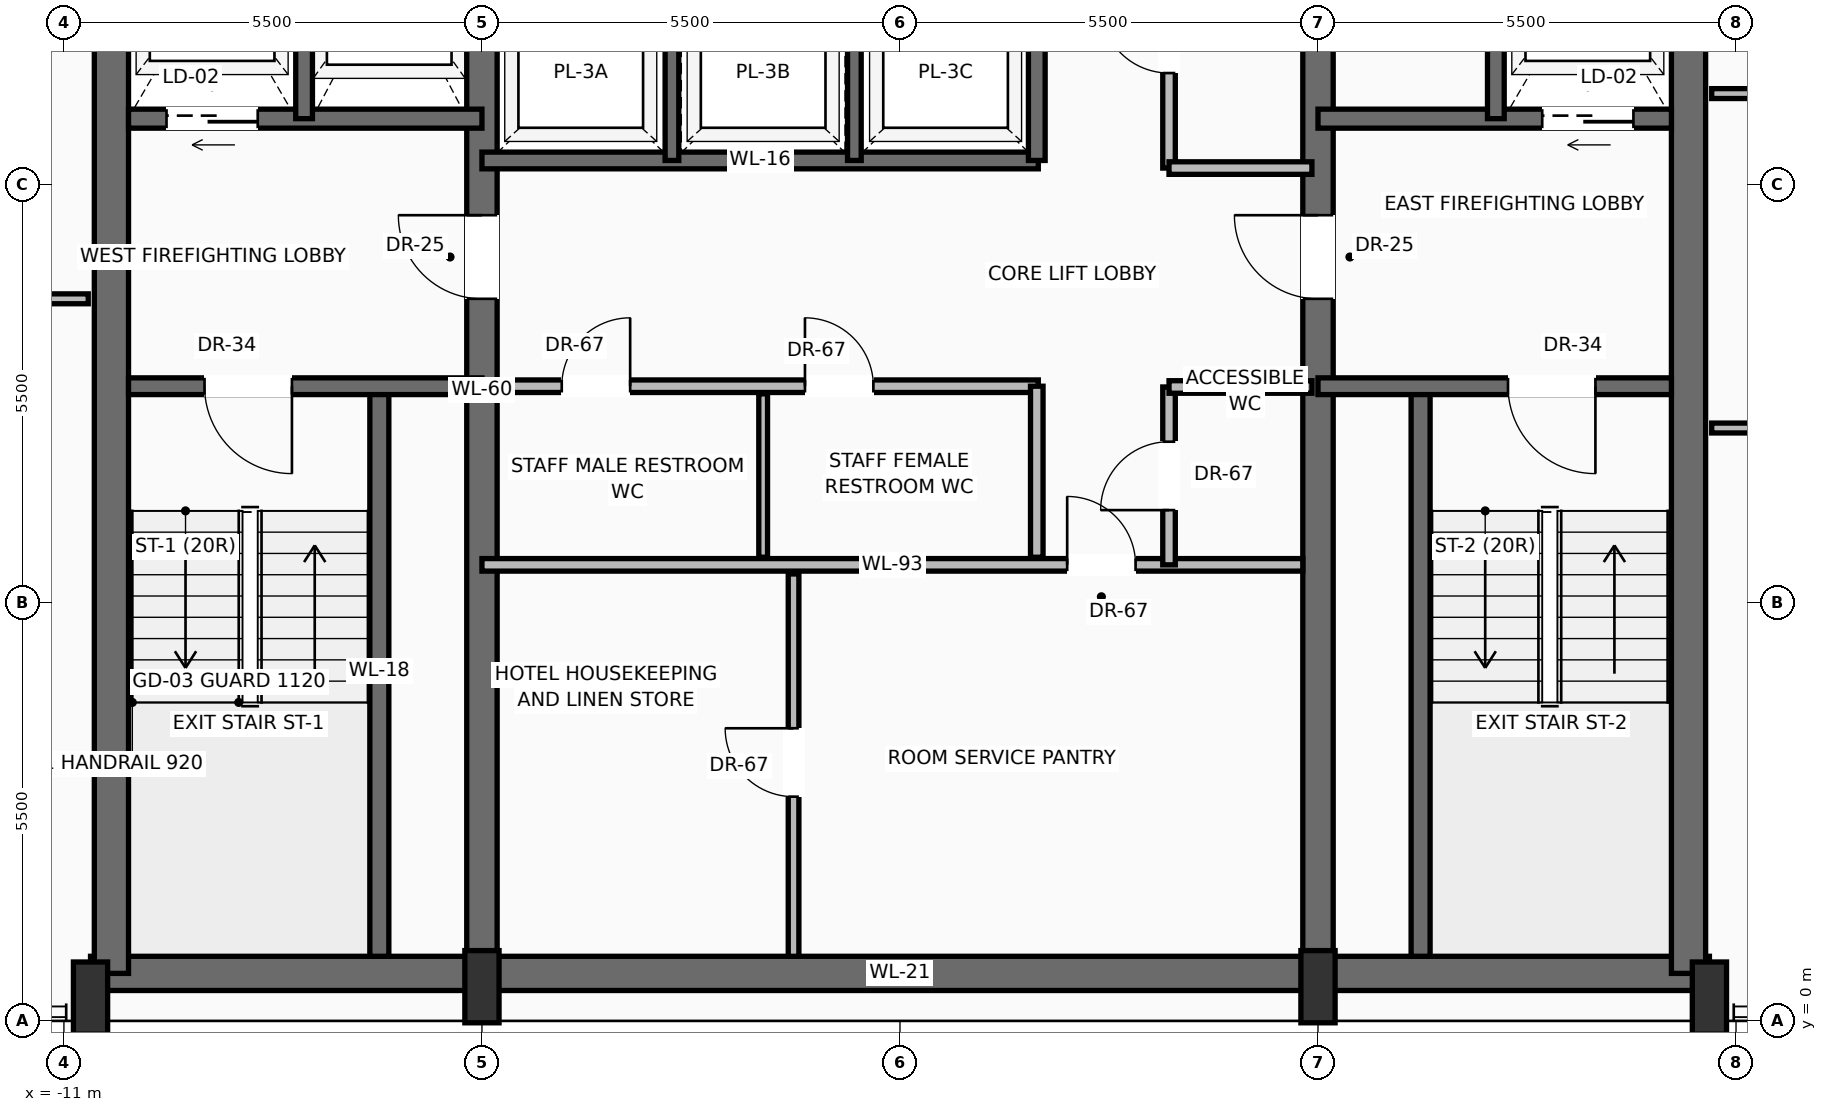
"""IFC4 building model, lengths in metres.
Left out: names, types, materials, properties, quantities, classifications, styles, units other than length and angle.
Written with IfcOpenShell. Run it as: python <this file> out.ifc"""

import sys

from ifc_helpers import new_model, si_unit, direction, frame, frame_2d, origin, origin_2d, place, context, subcontext, project, spatial, rectangle, extrude, source, transform, mapped, element, fill, save


model = new_model("IFC4")
c1 = context("Model", 3, precision=1e-05, world=origin(), true_north=direction((0.0, 1.0)))
c2 = subcontext(c1, "Body", "Model", "MODEL_VIEW")
j1 = project(units=[si_unit("LENGTHUNIT", "METRE"), si_unit("PLANEANGLEUNIT", "RADIAN")], contexts=[c1])
p1 = place(None, origin())
s1 = spatial("IfcSite", under=j1, at=p1, CompositionType="ELEMENT")
p2 = place(p1, origin())
s2 = spatial("IfcBuilding", under=s1, at=p2, CompositionType="ELEMENT")
p3 = place(p2, frame((0.0, 0.0, 297.15)))
s3 = spatial("IfcBuildingStorey", under=s2, at=p3, CompositionType="ELEMENT", Elevation=297.15)
p4 = place(p3, frame((-10.65, 0.625, 0.0), z_axis=(0.0, 0.0, 1.0), x_axis=(1.0, 0.0, 0.0)))
e1 = element("IfcWall", 1, at=p4, inside=s3, PredefinedType="SHEAR", context=c2, shape_type="SweptSolid", body=[
    extrude(rectangle(XDim=21.3, YDim=0.45, at=frame_2d((10.65, 0.0))), origin(), (0.0, 0.0, 1.0), 3.24),
])
for number, where, z_axis, x_axis in (
    (2, (-10.375, 0.625, 0.0), (0.0, 0.0, 1.0), (0.0, 1.0, 0.0)),
    (3, (10.375, 0.625, 0.0), (0.0, 0.0, 1.0), (0.0, 1.0, 0.0)),
):
    element("IfcWall", number, at=place(p3, frame(where, z_axis=z_axis, x_axis=x_axis)), inside=s3, PredefinedType="SHEAR", context=c2, shape_type="SweptSolid", body=[
        extrude(rectangle(XDim=15.35, YDim=0.45, at=frame_2d((7.675, 0.0))), origin(), (0.0, 0.0, 1.0), 3.24),
    ])
p5 = place(p3, frame((-5.5, 0.625, 0.0), z_axis=(0.0, 0.0, 1.0), x_axis=(0.0, 1.0, 0.0)))
e4 = element("IfcWall", 4, at=p5, inside=s3, PredefinedType="SHEAR", context=c2, shape_type="SweptSolid", body=[
    extrude(rectangle(XDim=15.35, YDim=0.4, at=frame_2d((7.675, 0.0))), origin(), (0.0, 0.0, 1.0), 3.24),
])
p6 = place(p5, frame((8.875, 0.0, 0.0)))
e5 = element("IfcOpeningElement", 5, at=p6, cuts=e4, PredefinedType="OPENING", context=c2, shape_type="SweptSolid", body=[
    extrude(rectangle(XDim=1.1, YDim=2.2, at=frame_2d((0.55, 1.1))), frame((0.0, 0.21, 0.0), z_axis=(0.0, -1.0, 0.0), x_axis=(1.0, 0.0, 0.0)), (0.0, 0.0, 1.0), 0.42),
])
p7 = place(p3, frame((5.5, 0.625, 0.0), z_axis=(0.0, 0.0, 1.0), x_axis=(0.0, 1.0, 0.0)))
e6 = element("IfcWall", 6, at=p7, inside=s3, PredefinedType="SHEAR", context=c2, shape_type="SweptSolid", body=[
    extrude(rectangle(XDim=15.35, YDim=0.4, at=frame_2d((7.675, 0.0))), origin(), (0.0, 0.0, 1.0), 3.24),
])
p8 = place(p7, frame((8.875, 0.0, 0.0)))
e7 = element("IfcOpeningElement", 7, at=p8, cuts=e6, PredefinedType="OPENING", context=c2, shape_type="SweptSolid", body=[
    extrude(rectangle(XDim=1.1, YDim=2.2, at=frame_2d((0.55, 1.1))), frame((0.0, 0.21, 0.0), z_axis=(0.0, -1.0, 0.0), x_axis=(1.0, 0.0, 0.0)), (0.0, 0.0, 1.0), 0.42),
])
m1 = source(origin(), c2, "Body", "SweptSolid", [
    extrude(rectangle(XDim=0.45, YDim=0.95, at=origin_2d()), origin(), (0.0, 0.0, 1.0), 3.45),
])
for number, where, z_axis, x_axis in (
    (8, (-10.65, 0.3, 0.0), (0.0, 0.0, 1.0), (1.0, 0.0, 0.0)),
    (9, (-5.5, 0.45, 0.0), (0.0, 0.0, 1.0), (1.0, 0.0, 0.0)),
    (10, (5.5, 0.45, 0.0), (0.0, 0.0, 1.0), (1.0, 0.0, 0.0)),
    (11, (10.65, 0.3, 0.0), (0.0, 0.0, 1.0), (1.0, 0.0, 0.0)),
):
    element("IfcColumn", number, at=place(p3, frame(where, z_axis=z_axis, x_axis=x_axis)), inside=s3, PredefinedType="PILASTER", context=c2, shape_type="MappedRepresentation", body=[
        mapped(m1, transform((0.0, 0.0, 0.0), scale=1.0)),
    ])
p9 = place(p3, frame((-6.85, 0.85, 0.0), z_axis=(0.0, 0.0, 1.0), x_axis=(0.0, 1.0, 0.0)))
e12 = element("IfcWall", 12, at=p9, inside=s3, PredefinedType="SOLIDWALL", context=c2, shape_type="SweptSolid", body=[
    extrude(rectangle(XDim=7.5, YDim=0.25, at=frame_2d((3.75, 0.0))), origin(), (0.0, 0.0, 1.0), 3.24),
])
p10 = place(p3, frame((-5.5, 8.35, 0.0), z_axis=(0.0, 0.0, 1.0), x_axis=(-1.0, 0.0, 0.0)))
e13 = element("IfcWall", 13, at=p10, inside=s3, PredefinedType="SOLIDWALL", context=c2, shape_type="SweptSolid", body=[
    extrude(rectangle(XDim=4.65, YDim=0.22, at=frame_2d((2.325, 0.0))), origin(), (0.0, 0.0, 1.0), 3.24),
])
p11 = place(p10, frame((2.5, 0.0, 0.0)))
e14 = element("IfcOpeningElement", 14, at=p11, cuts=e13, PredefinedType="OPENING", context=c2, shape_type="SweptSolid", body=[
    extrude(rectangle(XDim=1.15, YDim=2.2, at=frame_2d((0.575, 1.1))), frame((0.0, 0.12, 0.0), z_axis=(0.0, -1.0, 0.0), x_axis=(1.0, 0.0, 0.0)), (0.0, 0.0, 1.0), 0.24),
])
p12 = place(p3, frame((-5.5, 11.87, 0.0), z_axis=(0.0, 0.0, 1.0), x_axis=(-1.0, 0.0, 0.0)))
e15 = element("IfcWall", 15, at=p12, inside=s3, PredefinedType="SOLIDWALL", context=c2, shape_type="SweptSolid", body=[
    extrude(rectangle(XDim=4.65, YDim=0.25, at=frame_2d((2.325, 0.0))), origin(), (0.0, 0.0, 1.0), 3.24),
])
p13 = place(p12, frame((2.95, 0.0, 0.0)))
e16 = element("IfcOpeningElement", 16, at=p13, cuts=e15, PredefinedType="OPENING", context=c2, shape_type="SweptSolid", body=[
    extrude(rectangle(XDim=1.2, YDim=2.25, at=frame_2d((0.6, 1.125))), frame((0.0, 0.135, 0.0), z_axis=(0.0, -1.0, 0.0), x_axis=(1.0, 0.0, 0.0)), (0.0, 0.0, 1.0), 0.27),
])
p14 = place(p3, frame((-7.84, 11.87, 0.0), z_axis=(0.0, 0.0, 1.0), x_axis=(0.0, 1.0, 0.0)))
e17 = element("IfcWall", 17, at=p14, inside=s3, PredefinedType="SOLIDWALL", context=c2, shape_type="SweptSolid", body=[
    extrude(rectangle(XDim=3.88, YDim=0.22, at=frame_2d((1.94, 0.0))), origin(), (0.0, 0.0, 1.0), 3.24),
])
p15 = place(p3, frame((6.85, 0.85, 0.0), z_axis=(0.0, 0.0, 1.0), x_axis=(0.0, 1.0, 0.0)))
e18 = element("IfcWall", 18, at=p15, inside=s3, PredefinedType="SOLIDWALL", context=c2, shape_type="SweptSolid", body=[
    extrude(rectangle(XDim=7.5, YDim=0.25, at=frame_2d((3.75, 0.0))), origin(), (0.0, 0.0, 1.0), 3.24),
])
p16 = place(p3, frame((10.15, 8.35, 0.0), z_axis=(0.0, 0.0, 1.0), x_axis=(-1.0, 0.0, 0.0)))
e19 = element("IfcWall", 19, at=p16, inside=s3, PredefinedType="SOLIDWALL", context=c2, shape_type="SweptSolid", body=[
    extrude(rectangle(XDim=4.65, YDim=0.22, at=frame_2d((2.325, 0.0))), origin(), (0.0, 0.0, 1.0), 3.24),
])
p17 = place(p16, frame((1.0, 0.0, 0.0)))
e20 = element("IfcOpeningElement", 20, at=p17, cuts=e19, PredefinedType="OPENING", context=c2, shape_type="SweptSolid", body=[
    extrude(rectangle(XDim=1.15, YDim=2.2, at=frame_2d((0.575, 1.1))), frame((0.0, 0.12, 0.0), z_axis=(0.0, -1.0, 0.0), x_axis=(1.0, 0.0, 0.0)), (0.0, 0.0, 1.0), 0.24),
])
p18 = place(p3, frame((10.15, 11.87, 0.0), z_axis=(0.0, 0.0, 1.0), x_axis=(-1.0, 0.0, 0.0)))
e21 = element("IfcWall", 21, at=p18, inside=s3, PredefinedType="SOLIDWALL", context=c2, shape_type="SweptSolid", body=[
    extrude(rectangle(XDim=4.65, YDim=0.25, at=frame_2d((2.325, 0.0))), origin(), (0.0, 0.0, 1.0), 3.24),
])
p19 = place(p18, frame((0.5, 0.0, 0.0)))
e22 = element("IfcOpeningElement", 22, at=p19, cuts=e21, PredefinedType="OPENING", context=c2, shape_type="SweptSolid", body=[
    extrude(rectangle(XDim=1.2, YDim=2.25, at=frame_2d((0.6, 1.125))), frame((0.0, 0.135, 0.0), z_axis=(0.0, -1.0, 0.0), x_axis=(1.0, 0.0, 0.0)), (0.0, 0.0, 1.0), 0.27),
])
p20 = place(p3, frame((7.84, 11.87, 0.0), z_axis=(0.0, 0.0, 1.0), x_axis=(0.0, 1.0, 0.0)))
e23 = element("IfcWall", 23, at=p20, inside=s3, PredefinedType="SOLIDWALL", context=c2, shape_type="SweptSolid", body=[
    extrude(rectangle(XDim=3.88, YDim=0.22, at=frame_2d((1.94, 0.0))), origin(), (0.0, 0.0, 1.0), 3.24),
])
p21 = place(p3, frame((-5.5, 6.0, 0.0), z_axis=(0.0, 0.0, 1.0), x_axis=(1.0, 0.0, 0.0)))
e24 = element("IfcWall", 24, at=p21, inside=s3, PredefinedType="PARTITIONING", context=c2, shape_type="SweptSolid", body=[
    extrude(rectangle(XDim=10.8, YDim=0.165, at=frame_2d((5.4, 0.0))), origin(), (0.0, 0.0, 1.0), 3.232),
])
p22 = place(p21, frame((7.7, 0.0, 0.0)))
e25 = element("IfcOpeningElement", 25, at=p22, cuts=e24, PredefinedType="OPENING", context=c2, shape_type="SweptSolid", body=[
    extrude(rectangle(XDim=0.9, YDim=2.1, at=frame_2d((0.45, 1.05))), frame((0.0, 0.093, 0.0), z_axis=(0.0, -1.0, 0.0), x_axis=(1.0, 0.0, 0.0)), (0.0, 0.0, 1.0), 0.185),
])
p23 = place(p3, frame((-1.4, 0.85, 0.0), z_axis=(0.0, 0.0, 1.0), x_axis=(0.0, 1.0, 0.0)))
e26 = element("IfcWall", 26, at=p23, inside=s3, PredefinedType="PARTITIONING", context=c2, shape_type="SweptSolid", body=[
    extrude(rectangle(XDim=5.03, YDim=0.14, at=frame_2d((2.515, 0.0))), origin(), (0.0, 0.0, 1.0), 3.232),
])
p24 = place(p23, frame((2.1, 0.0, 0.0)))
e27 = element("IfcOpeningElement", 27, at=p24, cuts=e26, PredefinedType="OPENING", context=c2, shape_type="SweptSolid", body=[
    extrude(rectangle(XDim=0.9, YDim=2.1, at=frame_2d((0.45, 1.05))), frame((0.0, 0.08, 0.0), z_axis=(0.0, -1.0, 0.0), x_axis=(1.0, 0.0, 0.0)), (0.0, 0.0, 1.0), 0.16),
])
p25 = place(p3, frame((3.54, 6.0, 0.0), z_axis=(0.0, 0.0, 1.0), x_axis=(0.0, 1.0, 0.0)))
e28 = element("IfcWall", 28, at=p25, inside=s3, PredefinedType="PARTITIONING", context=c2, shape_type="SweptSolid", body=[
    extrude(rectangle(XDim=2.34, YDim=0.165, at=frame_2d((1.17, 0.0))), origin(), (0.0, 0.0, 1.0), 3.232),
])
p26 = place(p25, frame((0.72, 0.0, 0.0)))
e29 = element("IfcOpeningElement", 29, at=p26, cuts=e28, PredefinedType="OPENING", context=c2, shape_type="SweptSolid", body=[
    extrude(rectangle(XDim=0.9, YDim=2.1, at=frame_2d((0.45, 1.05))), frame((0.0, 0.093, 0.0), z_axis=(0.0, -1.0, 0.0), x_axis=(1.0, 0.0, 0.0)), (0.0, 0.0, 1.0), 0.185),
])
p27 = place(p3, frame((3.54, 8.34, 0.0), z_axis=(0.0, 0.0, 1.0), x_axis=(1.0, 0.0, 0.0)))
e30 = element("IfcWall", 30, at=p27, inside=s3, PredefinedType="PARTITIONING", context=c2, shape_type="SweptSolid", body=[
    extrude(rectangle(XDim=1.88, YDim=0.165, at=frame_2d((0.94, 0.0))), origin(), (0.0, 0.0, 1.0), 3.232),
])
p28 = place(p3, frame((-5.3, 8.35, 0.0), z_axis=(0.0, 0.0, 1.0), x_axis=(1.0, 0.0, 0.0)))
e31 = element("IfcWall", 31, at=p28, inside=s3, PredefinedType="PARTITIONING", context=c2, shape_type="SweptSolid", body=[
    extrude(rectangle(XDim=7.12, YDim=0.165, at=frame_2d((3.56, 0.0))), origin(), (0.0, 0.0, 1.0), 3.232),
])
p29 = place(p28, frame((0.85, 0.0, 0.0)))
e32 = element("IfcOpeningElement", 32, at=p29, cuts=e31, PredefinedType="OPENING", context=c2, shape_type="SweptSolid", body=[
    extrude(rectangle(XDim=0.9, YDim=2.1, at=frame_2d((0.45, 1.05))), frame((0.0, 0.093, 0.0), z_axis=(0.0, -1.0, 0.0), x_axis=(1.0, 0.0, 0.0)), (0.0, 0.0, 1.0), 0.185),
])
p30 = place(p28, frame((4.05, 0.0, 0.0)))
e33 = element("IfcOpeningElement", 33, at=p30, cuts=e31, PredefinedType="OPENING", context=c2, shape_type="SweptSolid", body=[
    extrude(rectangle(XDim=0.9, YDim=2.1, at=frame_2d((0.45, 1.05))), frame((0.0, 0.093, 0.0), z_axis=(0.0, -1.0, 0.0), x_axis=(1.0, 0.0, 0.0)), (0.0, 0.0, 1.0), 0.185),
])
p31 = place(p3, frame((1.8, 6.1, 0.0), z_axis=(0.0, 0.0, 1.0), x_axis=(0.0, 1.0, 0.0)))
e34 = element("IfcWall", 34, at=p31, inside=s3, PredefinedType="PARTITIONING", context=c2, shape_type="SweptSolid", body=[
    extrude(rectangle(XDim=2.25, YDim=0.165, at=frame_2d((1.125, 0.0))), origin(), (0.0, 0.0, 1.0), 3.232),
])
p32 = place(p3, frame((-1.8, 6.1, 0.0), z_axis=(0.0, 0.0, 1.0), x_axis=(0.0, 1.0, 0.0)))
e35 = element("IfcWall", 35, at=p32, inside=s3, PredefinedType="PARTITIONING", context=c2, shape_type="SweptSolid", body=[
    extrude(rectangle(XDim=2.15, YDim=0.115, at=frame_2d((1.075, 0.0))), origin(), (0.0, 0.0, 1.0), 3.232),
])
p33 = place(p3, frame((-5.5, 11.32, 0.0), z_axis=(0.0, 0.0, 1.0), x_axis=(1.0, 0.0, 0.0)))
e36 = element("IfcWall", 36, at=p33, inside=s3, PredefinedType="SOLIDWALL", context=c2, shape_type="SweptSolid", body=[
    extrude(rectangle(XDim=7.32, YDim=0.22, at=frame_2d((3.66, 0.0))), origin(), (0.0, 0.0, 1.0), 3.24),
])
p34 = place(p3, frame((1.8, 11.32, 0.0), z_axis=(0.0, 0.0, 1.0), x_axis=(0.0, 1.0, 0.0)))
e37 = element("IfcWall", 37, at=p34, inside=s3, PredefinedType="SOLIDWALL", context=c2, shape_type="SweptSolid", body=[
    extrude(rectangle(XDim=2.3, YDim=0.22, at=frame_2d((1.15, 0.0))), origin(), (0.0, 0.0, 1.0), 3.24),
])
for number, where, z_axis, x_axis in (
    (38, (-3.0, 11.32, 0.0), (0.0, 0.0, 1.0), (0.0, 1.0, 0.0)),
    (39, (-0.6, 11.32, 0.0), (0.0, 0.0, 1.0), (0.0, 1.0, 0.0)),
):
    element("IfcWall", number, at=place(p3, frame(where, z_axis=z_axis, x_axis=x_axis)), inside=s3, PredefinedType="SOLIDWALL", context=c2, shape_type="SweptSolid", body=[
        extrude(rectangle(XDim=2.3, YDim=0.18, at=frame_2d((1.15, 0.0))), origin(), (0.0, 0.0, 1.0), 3.24),
    ])
p35 = place(p3, frame((3.54, 11.22, 0.0), z_axis=(0.0, 0.0, 1.0), x_axis=(0.0, 1.0, 0.0)))
e40 = element("IfcWall", 40, at=p35, inside=s3, PredefinedType="PARTITIONING", context=c2, shape_type="SweptSolid", body=[
    extrude(rectangle(XDim=4.53, YDim=0.165, at=frame_2d((2.265, 0.0))), origin(), (0.0, 0.0, 1.0), 3.232),
])
p36 = place(p35, frame((1.25, 0.0, 0.0)))
e41 = element("IfcOpeningElement", 41, at=p36, cuts=e40, PredefinedType="OPENING", context=c2, shape_type="SweptSolid", body=[
    extrude(rectangle(XDim=0.9, YDim=2.1, at=frame_2d((0.45, 1.05))), frame((0.0, 0.093, 0.0), z_axis=(0.0, -1.0, 0.0), x_axis=(1.0, 0.0, 0.0)), (0.0, 0.0, 1.0), 0.185),
])
p37 = place(p3, frame((3.54, 11.22, 0.0), z_axis=(0.0, 0.0, 1.0), x_axis=(1.0, 0.0, 0.0)))
e42 = element("IfcWall", 42, at=p37, inside=s3, PredefinedType="PARTITIONING", context=c2, shape_type="SweptSolid", body=[
    extrude(rectangle(XDim=1.88, YDim=0.165, at=frame_2d((0.94, 0.0))), origin(), (0.0, 0.0, 1.0), 3.232),
])
p38 = place(p3, frame((-20.448, 9.5, 0.0), z_axis=(0.0, 0.0, 1.0), x_axis=(1.0, 0.0, 0.0)))
e43 = element("IfcWall", 43, at=p38, inside=s3, PredefinedType="PARTITIONING", context=c2, shape_type="SweptSolid", body=[
    extrude(rectangle(XDim=9.768, YDim=0.13, at=frame_2d((4.884, 0.0))), origin(), (0.0, 0.0, 1.0), 3.232),
])
p39 = place(p38, frame((3.954, 0.0, 0.0)))
e44 = element("IfcOpeningElement", 44, at=p39, cuts=e43, PredefinedType="OPENING", context=c2, shape_type="SweptSolid", body=[
    extrude(rectangle(XDim=0.95, YDim=2.2, at=frame_2d((0.475, 1.1))), frame((0.0, 0.075, 0.0), z_axis=(0.0, -1.0, 0.0), x_axis=(1.0, 0.0, 0.0)), (0.0, 0.0, 1.0), 0.15),
])
p40 = place(p3, frame((10.68, 7.8, 0.0), z_axis=(0.0, 0.0, 1.0), x_axis=(1.0, 0.0, 0.0)))
e45 = element("IfcWall", 45, at=p40, inside=s3, PredefinedType="PARTITIONING", context=c2, shape_type="SweptSolid", body=[
    extrude(rectangle(XDim=10.724, YDim=0.13, at=frame_2d((5.362, 0.0))), origin(), (0.0, 0.0, 1.0), 3.232),
])
p41 = place(p40, frame((4.385, 0.0, 0.0)))
e46 = element("IfcOpeningElement", 46, at=p41, cuts=e45, PredefinedType="OPENING", context=c2, shape_type="SweptSolid", body=[
    extrude(rectangle(XDim=0.95, YDim=2.2, at=frame_2d((0.475, 1.1))), frame((0.0, 0.075, 0.0), z_axis=(0.0, -1.0, 0.0), x_axis=(1.0, 0.0, 0.0)), (0.0, 0.0, 1.0), 0.15),
])
p42 = place(p3, frame((10.68, 12.2, 0.0), z_axis=(0.0, 0.0, 1.0), x_axis=(1.0, 0.0, 0.0)))
e47 = element("IfcWall", 47, at=p42, inside=s3, PredefinedType="PARTITIONING", context=c2, shape_type="SweptSolid", body=[
    extrude(rectangle(XDim=8.193, YDim=0.13, at=frame_2d((4.096, 0.0))), origin(), (0.0, 0.0, 1.0), 3.232),
])
p43 = place(p42, frame((3.246, 0.0, 0.0)))
e48 = element("IfcOpeningElement", 48, at=p43, cuts=e47, PredefinedType="OPENING", context=c2, shape_type="SweptSolid", body=[
    extrude(rectangle(XDim=0.95, YDim=2.2, at=frame_2d((0.475, 1.1))), frame((0.0, 0.075, 0.0), z_axis=(0.0, -1.0, 0.0), x_axis=(1.0, 0.0, 0.0)), (0.0, 0.0, 1.0), 0.15),
])
m2 = source(origin(), c2, "Body", "SweptSolid", [
    extrude(rectangle(XDim=1.15, YDim=2.2, at=frame_2d((0.575, 1.1))), frame((0.0, 0.025, 0.0), z_axis=(0.0, -1.0, 0.0), x_axis=(1.0, 0.0, 0.0)), (0.0, 0.0, 1.0), 0.05),
])
p44 = place(p11, origin())
e49 = element("IfcDoor", 49, at=p44, inside=s3, OperationType="SINGLE_SWING_LEFT", PredefinedType="DOOR", context=c2, shape_type="MappedRepresentation", body=[
    mapped(m2, transform((0.0, 0.0, 0.0), scale=1.0)),
])
fill(e14, e49)
m3 = source(origin(), c2, "Body", "SweptSolid", [
    extrude(rectangle(XDim=1.1, YDim=2.2, at=frame_2d((0.55, 1.1))), frame((0.0, 0.025, 0.0), z_axis=(0.0, -1.0, 0.0), x_axis=(1.0, 0.0, 0.0)), (0.0, 0.0, 1.0), 0.05),
])
p45 = place(p6, origin())
e50 = element("IfcDoor", 50, at=p45, inside=s3, OperationType="SINGLE_SWING_RIGHT", PredefinedType="DOOR", context=c2, shape_type="MappedRepresentation", body=[
    mapped(m3, transform((0.0, 0.0, 0.0), scale=1.0)),
])
fill(e5, e50)
m4 = source(origin(), c2, "Body", "SweptSolid", [
    extrude(rectangle(XDim=1.2, YDim=2.25, at=frame_2d((0.6, 1.125))), frame((0.0, 0.025, 0.0), z_axis=(0.0, -1.0, 0.0), x_axis=(1.0, 0.0, 0.0)), (0.0, 0.0, 1.0), 0.05),
])
p46 = place(p13, origin())
e51 = element("IfcDoor", 51, at=p46, inside=s3, OperationType="SLIDING_TO_LEFT", PredefinedType="DOOR", context=c2, shape_type="MappedRepresentation", body=[
    mapped(m4, transform((0.0, 0.0, 0.0), scale=1.0)),
])
fill(e16, e51)
p47 = place(p17, origin())
e52 = element("IfcDoor", 52, at=p47, inside=s3, OperationType="SINGLE_SWING_LEFT", PredefinedType="DOOR", context=c2, shape_type="MappedRepresentation", body=[
    mapped(m2, transform((0.0, 0.0, 0.0), scale=1.0)),
])
fill(e20, e52)
p48 = place(p8, origin())
e53 = element("IfcDoor", 53, at=p48, inside=s3, OperationType="SINGLE_SWING_RIGHT", PredefinedType="DOOR", context=c2, shape_type="MappedRepresentation", body=[
    mapped(m3, transform((0.0, 0.0, 0.0), scale=1.0)),
])
fill(e7, e53)
p49 = place(p19, origin())
e54 = element("IfcDoor", 54, at=p49, inside=s3, OperationType="SLIDING_TO_RIGHT", PredefinedType="DOOR", context=c2, shape_type="MappedRepresentation", body=[
    mapped(m4, transform((0.0, 0.0, 0.0), scale=1.0)),
])
fill(e22, e54)
m5 = source(origin(), c2, "Body", "SweptSolid", [
    extrude(rectangle(XDim=0.9, YDim=2.1, at=frame_2d((0.45, 1.05))), frame((0.0, 0.025, 0.0), z_axis=(0.0, -1.0, 0.0), x_axis=(1.0, 0.0, 0.0)), (0.0, 0.0, 1.0), 0.05),
])
p50 = place(p22, origin())
e55 = element("IfcDoor", 55, at=p50, inside=s3, OperationType="SINGLE_SWING_LEFT", PredefinedType="DOOR", context=c2, shape_type="MappedRepresentation", body=[
    mapped(m5, transform((0.0, 0.0, 0.0), scale=1.0)),
])
fill(e25, e55)
p51 = place(p24, origin())
e56 = element("IfcDoor", 56, at=p51, inside=s3, OperationType="SINGLE_SWING_RIGHT", PredefinedType="DOOR", context=c2, shape_type="MappedRepresentation", body=[
    mapped(m5, transform((0.0, 0.0, 0.0), scale=1.0)),
])
fill(e27, e56)
p52 = place(p26, origin())
e57 = element("IfcDoor", 57, at=p52, inside=s3, OperationType="SINGLE_SWING_LEFT", PredefinedType="DOOR", context=c2, shape_type="MappedRepresentation", body=[
    mapped(m5, transform((0.0, 0.0, 0.0), scale=1.0)),
])
fill(e29, e57)
p53 = place(p29, origin())
e58 = element("IfcDoor", 58, at=p53, inside=s3, OperationType="SINGLE_SWING_RIGHT", PredefinedType="DOOR", context=c2, shape_type="MappedRepresentation", body=[
    mapped(m5, transform((0.0, 0.0, 0.0), scale=1.0)),
])
fill(e32, e58)
p54 = place(p30, origin())
e59 = element("IfcDoor", 59, at=p54, inside=s3, OperationType="SINGLE_SWING_LEFT", PredefinedType="DOOR", context=c2, shape_type="MappedRepresentation", body=[
    mapped(m5, transform((0.0, 0.0, 0.0), scale=1.0)),
])
fill(e33, e59)
p55 = place(p36, origin())
e60 = element("IfcDoor", 60, at=p55, inside=s3, OperationType="SINGLE_SWING_RIGHT", PredefinedType="DOOR", context=c2, shape_type="MappedRepresentation", body=[
    mapped(m5, transform((0.0, 0.0, 0.0), scale=1.0)),
])
fill(e41, e60)
save(model, sys.argv[1])
